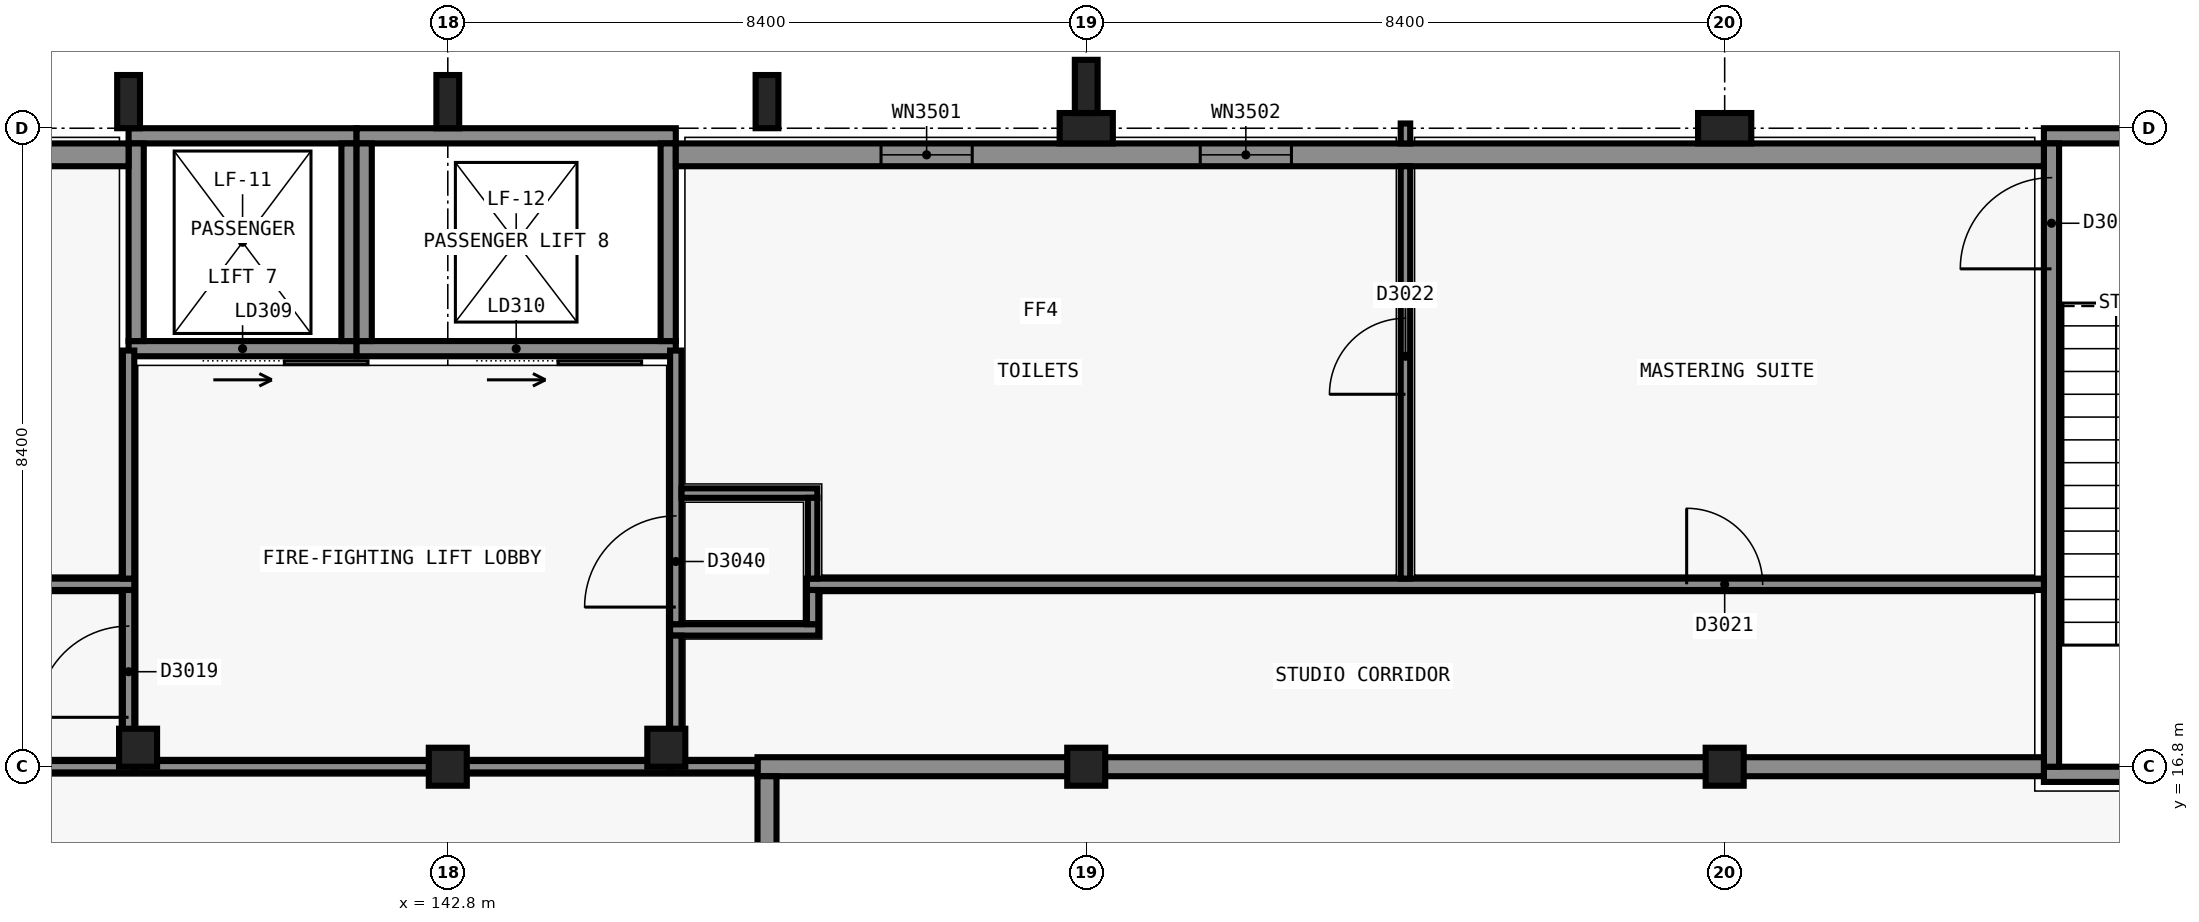
"""IFC4 building model, lengths in metres.
Left out: names, types, materials, properties, quantities, classifications, styles, units other than length and angle.
Written with IfcOpenShell. Run it as: python <this file> out.ifc"""

import sys

from ifc_helpers import new_model, si_unit, direction, frame, frame_2d, origin, origin_2d, place, context, subcontext, project, spatial, rectangle, extrude, element, fill, save


model = new_model("IFC4")
c1 = context("Model", 3, precision=1e-05, world=origin(), true_north=direction((0.0, 1.0)))
c2 = subcontext(c1, "Body", "Model", "MODEL_VIEW")
j1 = project(units=[si_unit("LENGTHUNIT", "METRE"), si_unit("PLANEANGLEUNIT", "RADIAN")], contexts=[c1])
p1 = place(None, origin())
s1 = spatial("IfcSite", under=j1, at=p1, CompositionType="ELEMENT")
p2 = place(p1, origin())
s2 = spatial("IfcBuilding", under=s1, at=p2, CompositionType="ELEMENT")
p3 = place(p2, frame((0.0, 0.0, 15.0)))
s3 = spatial("IfcBuildingStorey", under=s2, at=p3, CompositionType="ELEMENT", Elevation=15.0)
for number, where, z_axis, x_axis in (
    (1, (168.0, 16.7, 0.0), (0.0, 0.0, 1.0), (-1.0, 0.0, 0.0)),
    (2, (163.8, 25.1, 0.0), (0.0, 0.0, 1.0), (1.0, 0.0, 0.0)),
):
    element("IfcWall", number, at=place(p3, frame(where, z_axis=z_axis, x_axis=x_axis)), inside=s3, PredefinedType="SHEAR", context=c2, shape_type="SweptSolid", body=[
        extrude(rectangle(XDim=4.199, YDim=0.2, at=frame_2d((2.1, 0.0))), origin(), (0.0, 0.0, 1.0), 4.8),
    ])
p4 = place(p3, frame((163.9, 16.8, 0.0), z_axis=(0.0, 0.0, 1.0), x_axis=(0.0, 1.0, 0.0)))
e3 = element("IfcWall", 3, at=p4, inside=s3, PredefinedType="SHEAR", context=c2, shape_type="SweptSolid", body=[
    extrude(rectangle(XDim=8.2, YDim=0.2, at=frame_2d((4.1, 0.0))), origin(), (0.0, 0.0, 1.0), 4.8),
])
p5 = place(p4, frame((6.55, 0.0, 0.0)))
e4 = element("IfcOpeningElement", 4, at=p5, cuts=e3, PredefinedType="OPENING", context=c2, shape_type="SweptSolid", body=[
    extrude(rectangle(XDim=1.2, YDim=2.1, at=frame_2d((0.6, 1.05))), frame((0.0, 0.11, 0.0), z_axis=(0.0, -1.0, 0.0), x_axis=(1.0, 0.0, 0.0)), (0.0, 0.0, 1.0), 0.22),
])
p6 = place(p3, frame((141.6, 22.3, 0.0), z_axis=(0.0, 0.0, 1.0), x_axis=(-1.0, 0.0, 0.0)))
e5 = element("IfcWall", 5, at=p6, inside=s3, PredefinedType="SHEAR", context=c2, shape_type="SweptSolid", body=[
    extrude(rectangle(XDim=3.0, YDim=0.2, at=frame_2d((1.5, 0.0))), origin(), (0.0, 0.0, 1.0), 4.8),
])
p7 = place(p6, frame((0.95, 0.0, 0.0)))
e6 = element("IfcOpeningElement", 6, at=p7, cuts=e5, PredefinedType="OPENING", context=c2, shape_type="SweptSolid", body=[
    extrude(rectangle(XDim=1.1, YDim=2.1, at=frame_2d((0.55, 1.05))), frame((0.0, 0.11, 0.0), z_axis=(0.0, -1.0, 0.0), x_axis=(1.0, 0.0, 0.0)), (0.0, 0.0, 1.0), 0.22),
])
p8 = place(p3, frame((138.6, 25.1, 0.0), z_axis=(0.0, 0.0, 1.0), x_axis=(1.0, 0.0, 0.0)))
e7 = element("IfcWall", 7, at=p8, inside=s3, PredefinedType="SHEAR", context=c2, shape_type="SweptSolid", body=[
    extrude(rectangle(XDim=3.0, YDim=0.2, at=frame_2d((1.5, 0.0))), origin(), (0.0, 0.0, 1.0), 4.8),
])
for number, where, z_axis, x_axis in (
    (8, (138.7, 22.4, 0.0), (0.0, 0.0, 1.0), (0.0, 1.0, 0.0)),
    (9, (141.5, 25.0, 0.0), (0.0, 0.0, 1.0), (0.0, -1.0, 0.0)),
):
    element("IfcWall", number, at=place(p3, frame(where, z_axis=z_axis, x_axis=x_axis)), inside=s3, PredefinedType="SHEAR", context=c2, shape_type="SweptSolid", body=[
        extrude(rectangle(XDim=2.6, YDim=0.2, at=frame_2d((1.3, 0.0))), origin(), (0.0, 0.0, 1.0), 4.8),
    ])
p9 = place(p3, frame((145.8, 22.3, 0.0), z_axis=(0.0, 0.0, 1.0), x_axis=(-1.0, 0.0, 0.0)))
e10 = element("IfcWall", 10, at=p9, inside=s3, PredefinedType="SHEAR", context=c2, shape_type="SweptSolid", body=[
    extrude(rectangle(XDim=4.2, YDim=0.2, at=frame_2d((2.1, 0.0))), origin(), (0.0, 0.0, 1.0), 4.8),
])
p10 = place(p9, frame((1.55, 0.0, 0.0)))
e11 = element("IfcOpeningElement", 11, at=p10, cuts=e10, PredefinedType="OPENING", context=c2, shape_type="SweptSolid", body=[
    extrude(rectangle(XDim=1.1, YDim=2.1, at=frame_2d((0.55, 1.05))), frame((0.0, 0.11, 0.0), z_axis=(0.0, -1.0, 0.0), x_axis=(1.0, 0.0, 0.0)), (0.0, 0.0, 1.0), 0.22),
])
p11 = place(p3, frame((141.6, 25.1, 0.0), z_axis=(0.0, 0.0, 1.0), x_axis=(1.0, 0.0, 0.0)))
e12 = element("IfcWall", 12, at=p11, inside=s3, PredefinedType="SHEAR", context=c2, shape_type="SweptSolid", body=[
    extrude(rectangle(XDim=4.2, YDim=0.2, at=frame_2d((2.1, 0.0))), origin(), (0.0, 0.0, 1.0), 4.8),
])
for number, where, z_axis, x_axis in (
    (13, (141.7, 22.4, 0.0), (0.0, 0.0, 1.0), (0.0, 1.0, 0.0)),
    (14, (145.7, 25.0, 0.0), (0.0, 0.0, 1.0), (0.0, -1.0, 0.0)),
):
    element("IfcWall", number, at=place(p3, frame(where, z_axis=z_axis, x_axis=x_axis)), inside=s3, PredefinedType="SHEAR", context=c2, shape_type="SweptSolid", body=[
        extrude(rectangle(XDim=2.6, YDim=0.2, at=frame_2d((1.3, 0.0))), origin(), (0.0, 0.0, 1.0), 4.8),
    ])
for number, where, z_axis, x_axis in (
    (15, (142.8, 16.8, 0.0), (0.0, 0.0, 1.0), (1.0, 0.0, 0.0)),
    (16, (151.2, 16.8, 0.0), (0.0, 0.0, 1.0), (1.0, 0.0, 0.0)),
):
    element("IfcColumn", number, at=place(p3, frame(where, z_axis=z_axis, x_axis=x_axis)), inside=s3, PredefinedType="COLUMN", context=c2, shape_type="SweptSolid", body=[
        extrude(rectangle(XDim=0.5, YDim=0.5, at=origin_2d()), origin(), (0.0, 0.0, 1.0), 4.8),
    ])
p12 = place(p3, frame((151.2, 25.2, 0.0), z_axis=(0.0, 0.0, 1.0), x_axis=(1.0, 0.0, 0.0)))
e17 = element("IfcColumn", 17, at=p12, inside=s3, PredefinedType="COLUMN", context=c2, shape_type="SweptSolid", body=[
    extrude(rectangle(XDim=0.7, YDim=0.4, at=origin_2d()), origin(), (0.0, 0.0, 1.0), 4.8),
])
p13 = place(p3, frame((159.6, 16.8, 0.0), z_axis=(0.0, 0.0, 1.0), x_axis=(1.0, 0.0, 0.0)))
e18 = element("IfcColumn", 18, at=p13, inside=s3, PredefinedType="COLUMN", context=c2, shape_type="SweptSolid", body=[
    extrude(rectangle(XDim=0.5, YDim=0.5, at=origin_2d()), origin(), (0.0, 0.0, 1.0), 4.8),
])
p14 = place(p3, frame((159.6, 25.2, 0.0), z_axis=(0.0, 0.0, 1.0), x_axis=(1.0, 0.0, 0.0)))
e19 = element("IfcColumn", 19, at=p14, inside=s3, PredefinedType="COLUMN", context=c2, shape_type="SweptSolid", body=[
    extrude(rectangle(XDim=0.7, YDim=0.4, at=origin_2d()), origin(), (0.0, 0.0, 1.0), 4.8),
])
for number, where, z_axis, x_axis in (
    (20, (138.725, 17.05, 0.0), (0.0, 0.0, 1.0), (1.0, 0.0, 0.0)),
    (21, (145.675, 17.05, 0.0), (0.0, 0.0, 1.0), (1.0, 0.0, 0.0)),
):
    element("IfcColumn", number, at=place(p3, frame(where, z_axis=z_axis, x_axis=x_axis)), inside=s3, PredefinedType="COLUMN", context=c2, shape_type="SweptSolid", body=[
        extrude(rectangle(XDim=0.5, YDim=0.5, at=origin_2d()), origin(), (0.0, 0.0, 1.0), 4.8),
    ])
p15 = place(p3, frame((130.2, 24.85, 0.0), z_axis=(0.0, 0.0, 1.0), x_axis=(1.0, 0.0, 0.0)))
e22 = element("IfcWall", 22, at=p15, inside=s3, PredefinedType="SOLIDWALL", context=c2, shape_type="SweptSolid", body=[
    extrude(rectangle(XDim=8.4, YDim=0.3, at=frame_2d((4.2, 0.0))), origin(), (0.0, 0.0, 1.0), 4.5),
])
p16 = place(p3, frame((145.8, 24.85, 0.0), z_axis=(0.0, 0.0, 1.0), x_axis=(1.0, 0.0, 0.0)))
e23 = element("IfcWall", 23, at=p16, inside=s3, PredefinedType="SOLIDWALL", context=c2, shape_type="SweptSolid", body=[
    extrude(rectangle(XDim=18.0, YDim=0.3, at=frame_2d((9.0, 0.0))), origin(), (0.0, 0.0, 1.0), 4.5),
])
p17 = place(p16, frame((2.7, 0.0, 1.5)))
e24 = element("IfcOpeningElement", 24, at=p17, cuts=e23, PredefinedType="OPENING", context=c2, shape_type="SweptSolid", body=[
    extrude(rectangle(XDim=1.2, YDim=0.9, at=frame_2d((0.6, 0.45))), frame((0.0, 0.16, 0.0), z_axis=(0.0, -1.0, 0.0), x_axis=(1.0, 0.0, 0.0)), (0.0, 0.0, 1.0), 0.32),
])
p18 = place(p16, frame((6.9, 0.0, 1.5)))
e25 = element("IfcOpeningElement", 25, at=p18, cuts=e23, PredefinedType="OPENING", context=c2, shape_type="SweptSolid", body=[
    extrude(rectangle(XDim=1.2, YDim=0.9, at=frame_2d((0.6, 0.45))), frame((0.0, 0.16, 0.0), z_axis=(0.0, -1.0, 0.0), x_axis=(1.0, 0.0, 0.0)), (0.0, 0.0, 1.0), 0.32),
])
for number, where, z_axis, x_axis in (
    (26, (138.6, 25.55, 0.0), (0.0, 0.0, 1.0), (1.0, 0.0, 0.0)),
    (27, (142.8, 25.55, 0.0), (0.0, 0.0, 1.0), (1.0, 0.0, 0.0)),
    (28, (147.0, 25.55, 0.0), (0.0, 0.0, 1.0), (1.0, 0.0, 0.0)),
    (29, (151.2, 25.75, 0.0), (0.0, 0.0, 1.0), (1.0, 0.0, 0.0)),
):
    element("IfcColumn", number, at=place(p3, frame(where, z_axis=z_axis, x_axis=x_axis)), inside=s3, PredefinedType="PILASTER", context=c2, shape_type="SweptSolid", body=[
        extrude(rectangle(XDim=0.3, YDim=0.7, at=origin_2d()), origin(), (0.0, 0.0, 1.0), 4.8),
    ])
p19 = place(p3, frame((146.875, 16.8, 0.0), z_axis=(0.0, 0.0, 1.0), x_axis=(1.0, 0.0, 0.0)))
e30 = element("IfcWall", 30, at=p19, inside=s3, PredefinedType="PARTITIONING", context=c2, shape_type="SweptSolid", body=[
    extrude(rectangle(XDim=16.925, YDim=0.25, at=frame_2d((8.462, 0.0))), origin(), (0.0, 0.0, 1.0), 3.7),
])
p20 = place(p3, frame((147.0, 12.8, 0.0), z_axis=(0.0, 0.0, 1.0), x_axis=(0.0, 1.0, 0.0)))
e31 = element("IfcWall", 31, at=p20, inside=s3, PredefinedType="PARTITIONING", context=c2, shape_type="SweptSolid", body=[
    extrude(rectangle(XDim=3.875, YDim=0.25, at=frame_2d((1.938, 0.0))), origin(), (0.0, 0.0, 1.0), 3.7),
])
p21 = place(p20, frame((1.3, 0.0, 0.0)))
e32 = element("IfcOpeningElement", 32, at=p21, cuts=e31, PredefinedType="OPENING", context=c2, shape_type="SweptSolid", body=[
    extrude(rectangle(XDim=1.2, YDim=2.1, at=frame_2d((0.6, 1.05))), frame((0.0, 0.135, 0.0), z_axis=(0.0, -1.0, 0.0), x_axis=(1.0, 0.0, 0.0)), (0.0, 0.0, 1.0), 0.27),
])
p22 = place(p3, frame((134.525, 16.8, 0.0), z_axis=(0.0, 0.0, 1.0), x_axis=(1.0, 0.0, 0.0)))
e33 = element("IfcWall", 33, at=p22, inside=s3, PredefinedType="PARTITIONING", context=c2, shape_type="SweptSolid", body=[
    extrude(rectangle(XDim=4.15, YDim=0.15, at=frame_2d((2.075, 0.0))), origin(), (0.0, 0.0, 1.0), 3.7),
])
p23 = place(p22, frame((1.475, 0.0, 0.0)))
e34 = element("IfcOpeningElement", 34, at=p23, cuts=e33, PredefinedType="OPENING", context=c2, shape_type="SweptSolid", body=[
    extrude(rectangle(XDim=1.0, YDim=2.1, at=frame_2d((0.5, 1.05))), frame((0.0, 0.085, 0.0), z_axis=(0.0, -1.0, 0.0), x_axis=(1.0, 0.0, 0.0)), (0.0, 0.0, 1.0), 0.17),
])
p24 = place(p3, frame((145.725, 16.8, 0.0), z_axis=(0.0, 0.0, 1.0), x_axis=(1.0, 0.0, 0.0)))
e35 = element("IfcWall", 35, at=p24, inside=s3, PredefinedType="PARTITIONING", context=c2, shape_type="SweptSolid", body=[
    extrude(rectangle(XDim=1.15, YDim=0.15, at=frame_2d((0.575, 0.0))), origin(), (0.0, 0.0, 1.0), 3.7),
])
p25 = place(p3, frame((145.725, 18.6, 0.0), z_axis=(0.0, 0.0, 1.0), x_axis=(1.0, 0.0, 0.0)))
e36 = element("IfcWall", 36, at=p25, inside=s3, PredefinedType="PARTITIONING", context=c2, shape_type="SweptSolid", body=[
    extrude(rectangle(XDim=1.95, YDim=0.15, at=frame_2d((0.975, 0.0))), origin(), (0.0, 0.0, 1.0), 3.9),
])
p26 = place(p3, frame((130.2, 19.2, 0.0), z_axis=(0.0, 0.0, 1.0), x_axis=(1.0, 0.0, 0.0)))
e37 = element("IfcWall", 37, at=p26, inside=s3, PredefinedType="PARTITIONING", context=c2, shape_type="SweptSolid", body=[
    extrude(rectangle(XDim=8.475, YDim=0.15, at=frame_2d((4.237, 0.0))), origin(), (0.0, 0.0, 1.0), 3.7),
])
p27 = place(p26, frame((3.7, 0.0, 0.0)))
e38 = element("IfcOpeningElement", 38, at=p27, cuts=e37, PredefinedType="OPENING", context=c2, shape_type="SweptSolid", body=[
    extrude(rectangle(XDim=1.0, YDim=2.1, at=frame_2d((0.5, 1.05))), frame((0.0, 0.085, 0.0), z_axis=(0.0, -1.0, 0.0), x_axis=(1.0, 0.0, 0.0)), (0.0, 0.0, 1.0), 0.17),
])
p28 = place(p3, frame((147.525, 19.2, 0.0), z_axis=(0.0, 0.0, 1.0), x_axis=(1.0, 0.0, 0.0)))
e39 = element("IfcWall", 39, at=p28, inside=s3, PredefinedType="PARTITIONING", context=c2, shape_type="SweptSolid", body=[
    extrude(rectangle(XDim=16.275, YDim=0.15, at=frame_2d((8.137, 0.0))), origin(), (0.0, 0.0, 1.0), 3.7),
])
p29 = place(p28, frame((11.575, 0.0, 0.0)))
e40 = element("IfcOpeningElement", 40, at=p29, cuts=e39, PredefinedType="OPENING", context=c2, shape_type="SweptSolid", body=[
    extrude(rectangle(XDim=1.0, YDim=2.1, at=frame_2d((0.5, 1.05))), frame((0.0, 0.085, 0.0), z_axis=(0.0, -1.0, 0.0), x_axis=(1.0, 0.0, 0.0)), (0.0, 0.0, 1.0), 0.17),
])
p30 = place(p3, frame((138.675, 16.8, 0.0), z_axis=(0.0, 0.0, 1.0), x_axis=(1.0, 0.0, 0.0)))
e41 = element("IfcWall", 41, at=p30, inside=s3, PredefinedType="SOLIDWALL", context=c2, shape_type="SweptSolid", body=[
    extrude(rectangle(XDim=7.05, YDim=0.15, at=frame_2d((3.525, 0.0))), origin(), (0.0, 0.0, 1.0), 3.7),
])
p31 = place(p3, frame((147.6, 18.675, 0.0), z_axis=(0.0, 0.0, 1.0), x_axis=(0.0, 1.0, 0.0)))
e42 = element("IfcWall", 42, at=p31, inside=s3, PredefinedType="PARTITIONING", context=c2, shape_type="SweptSolid", body=[
    extrude(rectangle(XDim=0.45, YDim=0.15, at=frame_2d((0.225, 0.0))), origin(), (0.0, 0.0, 1.0), 4.4),
])
p32 = place(p3, frame((138.6, 16.875, 0.0), z_axis=(0.0, 0.0, 1.0), x_axis=(0.0, 1.0, 0.0)))
e43 = element("IfcWall", 43, at=p32, inside=s3, PredefinedType="SOLIDWALL", context=c2, shape_type="SweptSolid", body=[
    extrude(rectangle(XDim=2.25, YDim=0.15, at=frame_2d((1.125, 0.0))), origin(), (0.0, 0.0, 1.0), 3.7),
])
p33 = place(p32, frame((0.575, 0.0, 0.0)))
e44 = element("IfcOpeningElement", 44, at=p33, cuts=e43, PredefinedType="OPENING", context=c2, shape_type="SweptSolid", body=[
    extrude(rectangle(XDim=1.2, YDim=2.1, at=frame_2d((0.6, 1.05))), frame((0.0, 0.085, 0.0), z_axis=(0.0, -1.0, 0.0), x_axis=(1.0, 0.0, 0.0)), (0.0, 0.0, 1.0), 0.17),
])
p34 = place(p3, frame((138.6, 19.275, 0.0), z_axis=(0.0, 0.0, 1.0), x_axis=(0.0, 1.0, 0.0)))
e45 = element("IfcWall", 45, at=p34, inside=s3, PredefinedType="SOLIDWALL", context=c2, shape_type="SweptSolid", body=[
    extrude(rectangle(XDim=3.0, YDim=0.15, at=frame_2d((1.5, 0.0))), origin(), (0.0, 0.0, 1.0), 3.9),
])
p35 = place(p3, frame((145.8, 16.875, 0.0), z_axis=(0.0, 0.0, 1.0), x_axis=(0.0, 1.0, 0.0)))
e46 = element("IfcWall", 46, at=p35, inside=s3, PredefinedType="SOLIDWALL", context=c2, shape_type="SweptSolid", body=[
    extrude(rectangle(XDim=1.65, YDim=0.15, at=frame_2d((0.825, 0.0))), origin(), (0.0, 0.0, 1.0), 3.7),
])
p36 = place(p3, frame((145.8, 18.675, 0.0), z_axis=(0.0, 0.0, 1.0), x_axis=(0.0, 1.0, 0.0)))
e47 = element("IfcWall", 47, at=p36, inside=s3, PredefinedType="SOLIDWALL", context=c2, shape_type="SweptSolid", body=[
    extrude(rectangle(XDim=3.6, YDim=0.15, at=frame_2d((1.8, 0.0))), origin(), (0.0, 0.0, 1.0), 3.9),
])
p37 = place(p36, frame((0.225, 0.0, 0.0)))
e48 = element("IfcOpeningElement", 48, at=p37, cuts=e47, PredefinedType="OPENING", context=c2, shape_type="SweptSolid", body=[
    extrude(rectangle(XDim=1.2, YDim=2.1, at=frame_2d((0.6, 1.05))), frame((0.0, 0.085, 0.0), z_axis=(0.0, -1.0, 0.0), x_axis=(1.0, 0.0, 0.0)), (0.0, 0.0, 1.0), 0.17),
])
p38 = place(p3, frame((145.875, 20.4, 0.0), z_axis=(0.0, 0.0, 1.0), x_axis=(1.0, 0.0, 0.0)))
e49 = element("IfcWall", 49, at=p38, inside=s3, PredefinedType="PARTITIONING", context=c2, shape_type="SweptSolid", body=[
    extrude(rectangle(XDim=1.788, YDim=0.125, at=frame_2d((0.894, 0.0))), origin(), (0.0, 0.0, 1.0), 3.9),
])
p39 = place(p3, frame((147.6, 19.275, 0.0), z_axis=(0.0, 0.0, 1.0), x_axis=(0.0, 1.0, 0.0)))
e50 = element("IfcWall", 50, at=p39, inside=s3, PredefinedType="PARTITIONING", context=c2, shape_type="SweptSolid", body=[
    extrude(rectangle(XDim=1.062, YDim=0.125, at=frame_2d((0.531, 0.0))), origin(), (0.0, 0.0, 1.0), 4.4),
])
p40 = place(p3, frame((155.4, 19.275, 0.0), z_axis=(0.0, 0.0, 1.0), x_axis=(0.0, 1.0, 0.0)))
e51 = element("IfcWall", 51, at=p40, inside=s3, PredefinedType="PARTITIONING", context=c2, shape_type="SweptSolid", body=[
    extrude(rectangle(XDim=5.425, YDim=0.125, at=frame_2d((2.712, 0.0))), origin(), (0.0, 0.0, 1.0), 3.7),
])
p41 = place(p40, frame((2.425, 0.0, 0.0)))
e52 = element("IfcOpeningElement", 52, at=p41, cuts=e51, PredefinedType="OPENING", context=c2, shape_type="SweptSolid", body=[
    extrude(rectangle(XDim=1.0, YDim=2.1, at=frame_2d((0.5, 1.05))), frame((0.0, 0.073, 0.0), z_axis=(0.0, -1.0, 0.0), x_axis=(1.0, 0.0, 0.0)), (0.0, 0.0, 1.0), 0.145),
])
p42 = place(p3, frame((155.4, 25.0, 0.0), z_axis=(0.0, 0.0, 1.0), x_axis=(0.0, 1.0, 0.0)))
e53 = element("IfcWall", 53, at=p42, inside=s3, PredefinedType="PARTITIONING", context=c2, shape_type="SweptSolid", body=[
    extrude(rectangle(XDim=0.262, YDim=0.125, at=frame_2d((0.131, 0.0))), origin(), (0.0, 0.0, 1.0), 3.7),
])
p43 = place(p17, origin())
e54 = element("IfcWindow", 54, at=p43, inside=s3, PartitioningType="SINGLE_PANEL", PredefinedType="WINDOW", context=c2, shape_type="SweptSolid", body=[
    extrude(rectangle(XDim=1.2, YDim=0.9, at=frame_2d((0.6, 0.45))), frame((0.0, 0.03, 0.0), z_axis=(0.0, -1.0, 0.0), x_axis=(1.0, 0.0, 0.0)), (0.0, 0.0, 1.0), 0.06),
])
fill(e24, e54)
p44 = place(p18, origin())
e55 = element("IfcWindow", 55, at=p44, inside=s3, PartitioningType="SINGLE_PANEL", PredefinedType="WINDOW", context=c2, shape_type="SweptSolid", body=[
    extrude(rectangle(XDim=1.2, YDim=0.9, at=frame_2d((0.6, 0.45))), frame((0.0, 0.03, 0.0), z_axis=(0.0, -1.0, 0.0), x_axis=(1.0, 0.0, 0.0)), (0.0, 0.0, 1.0), 0.06),
])
fill(e25, e55)
p45 = place(p7, origin())
e56 = element("IfcDoor", 56, at=p45, inside=s3, OperationType="SLIDING_TO_LEFT", PredefinedType="DOOR", context=c2, shape_type="SweptSolid", body=[
    extrude(rectangle(XDim=1.1, YDim=2.1, at=frame_2d((0.55, 1.05))), frame((0.0, 0.025, 0.0), z_axis=(0.0, -1.0, 0.0), x_axis=(1.0, 0.0, 0.0)), (0.0, 0.0, 1.0), 0.05),
])
fill(e6, e56)
p46 = place(p10, origin())
e57 = element("IfcDoor", 57, at=p46, inside=s3, OperationType="SLIDING_TO_LEFT", PredefinedType="DOOR", context=c2, shape_type="SweptSolid", body=[
    extrude(rectangle(XDim=1.1, YDim=2.1, at=frame_2d((0.55, 1.05))), frame((0.0, 0.025, 0.0), z_axis=(0.0, -1.0, 0.0), x_axis=(1.0, 0.0, 0.0)), (0.0, 0.0, 1.0), 0.05),
])
fill(e11, e57)
p47 = place(p5, origin())
e58 = element("IfcDoor", 58, at=p47, inside=s3, OperationType="SINGLE_SWING_RIGHT", PredefinedType="DOOR", context=c2, shape_type="SweptSolid", body=[
    extrude(rectangle(XDim=1.2, YDim=2.1, at=frame_2d((0.6, 1.05))), frame((0.0, 0.025, 0.0), z_axis=(0.0, -1.0, 0.0), x_axis=(1.0, 0.0, 0.0)), (0.0, 0.0, 1.0), 0.05),
])
fill(e4, e58)
p48 = place(p33, origin())
e59 = element("IfcDoor", 59, at=p48, inside=s3, OperationType="SINGLE_SWING_RIGHT", PredefinedType="DOOR", context=c2, shape_type="SweptSolid", body=[
    extrude(rectangle(XDim=1.2, YDim=2.1, at=frame_2d((0.6, 1.05))), frame((0.0, 0.025, 0.0), z_axis=(0.0, -1.0, 0.0), x_axis=(1.0, 0.0, 0.0)), (0.0, 0.0, 1.0), 0.05),
])
fill(e44, e59)
p49 = place(p29, origin())
e60 = element("IfcDoor", 60, at=p49, inside=s3, OperationType="SINGLE_SWING_RIGHT", PredefinedType="DOOR", context=c2, shape_type="SweptSolid", body=[
    extrude(rectangle(XDim=1.0, YDim=2.1, at=frame_2d((0.5, 1.05))), frame((0.0, 0.025, 0.0), z_axis=(0.0, -1.0, 0.0), x_axis=(1.0, 0.0, 0.0)), (0.0, 0.0, 1.0), 0.05),
])
fill(e40, e60)
p50 = place(p41, origin())
e61 = element("IfcDoor", 61, at=p50, inside=s3, OperationType="SINGLE_SWING_RIGHT", PredefinedType="DOOR", context=c2, shape_type="SweptSolid", body=[
    extrude(rectangle(XDim=1.0, YDim=2.1, at=frame_2d((0.5, 1.05))), frame((0.0, 0.025, 0.0), z_axis=(0.0, -1.0, 0.0), x_axis=(1.0, 0.0, 0.0)), (0.0, 0.0, 1.0), 0.05),
])
fill(e52, e61)
p51 = place(p37, origin())
e62 = element("IfcDoor", 62, at=p51, inside=s3, OperationType="SINGLE_SWING_RIGHT", PredefinedType="DOOR", context=c2, shape_type="SweptSolid", body=[
    extrude(rectangle(XDim=1.2, YDim=2.1, at=frame_2d((0.6, 1.05))), frame((0.0, 0.025, 0.0), z_axis=(0.0, -1.0, 0.0), x_axis=(1.0, 0.0, 0.0)), (0.0, 0.0, 1.0), 0.05),
])
fill(e48, e62)
save(model, sys.argv[1])
